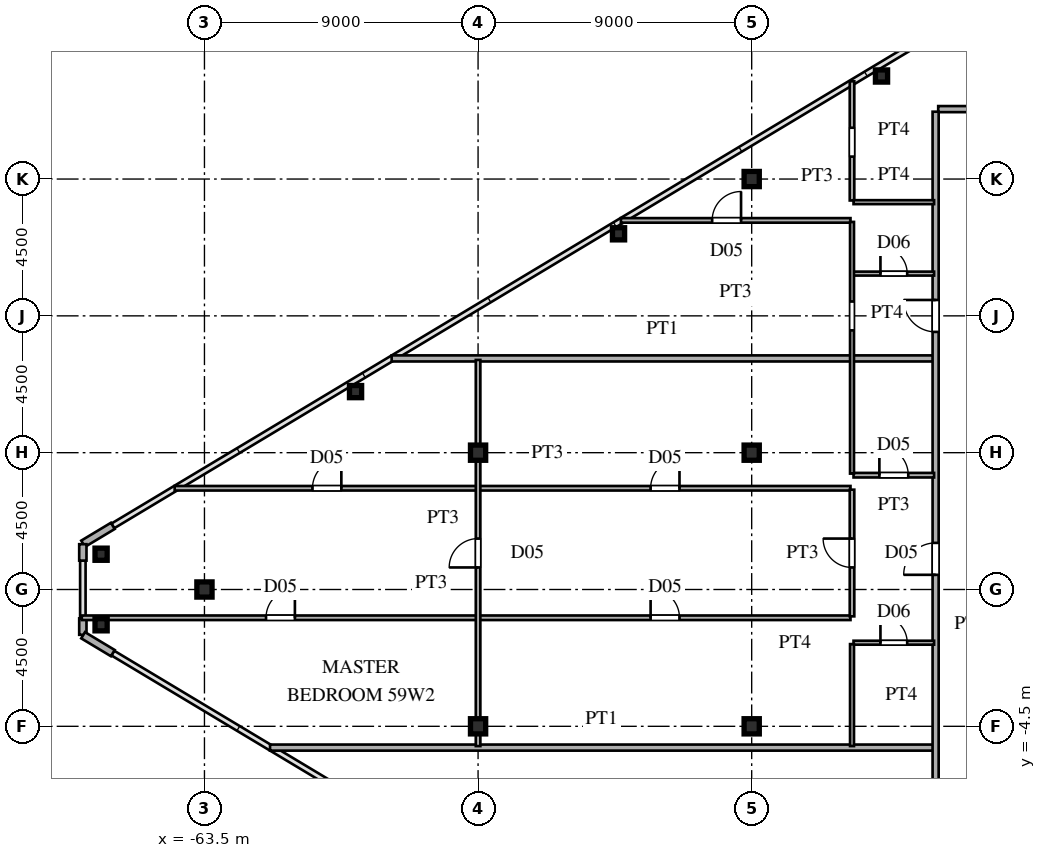
"""IFC4 building model, lengths in metres.
Left out: names, types, materials, properties, quantities, classifications, styles, units other than length and angle.
Written with IfcOpenShell. Run it as: python <this file> out.ifc"""

import sys

from ifc_helpers import new_model, si_unit, direction, frame, frame_2d, origin, origin_2d, place, context, subcontext, project, spatial, rectangle, hollow_rectangle, i_section, extrude, source, transform, mapped, element, fill, save


model = new_model("IFC4")
c1 = context("Model", 3, precision=1e-05, world=origin(), true_north=direction((0.0, 1.0)))
c2 = subcontext(c1, "Body", "Model", "MODEL_VIEW")
j1 = project(units=[si_unit("LENGTHUNIT", "METRE"), si_unit("PLANEANGLEUNIT", "RADIAN")], contexts=[c1])
p1 = place(None, origin())
s1 = spatial("IfcSite", under=j1, at=p1, CompositionType="ELEMENT")
p2 = place(p1, origin())
s2 = spatial("IfcBuilding", under=s1, at=p2, CompositionType="ELEMENT")
p3 = place(p2, frame((0.0, 0.0, 221.1)))
s3 = spatial("IfcBuildingStorey", under=s2, at=p3, CompositionType="ELEMENT", Elevation=221.1)
m1 = source(origin(), c2, "Body", "SweptSolid", [
    extrude(i_section(OverallWidth=0.5, OverallDepth=0.5, WebThickness=0.02, FlangeThickness=0.032, at=origin_2d()), origin(), (0.0, 0.0, 1.0), 3.6),
])
for number, where, z_axis, x_axis in (
    (1, (-45.5, -4.5, 0.0), (0.0, 0.0, 1.0), (1.0, 0.0, 0.0)),
    (2, (-45.5, 4.5, 0.0), (0.0, 0.0, 1.0), (1.0, 0.0, 0.0)),
    (3, (-45.5, 13.5, 0.0), (0.0, 0.0, 1.0), (1.0, 0.0, 0.0)),
    (4, (-54.5, -4.5, 0.0), (0.0, 0.0, 1.0), (1.0, 0.0, 0.0)),
    (5, (-54.5, 4.5, 0.0), (0.0, 0.0, 1.0), (1.0, 0.0, 0.0)),
    (6, (-63.5, 0.0, 0.0), (0.0, 0.0, 1.0), (1.0, 0.0, 0.0)),
):
    element("IfcColumn", number, at=place(p3, frame(where, z_axis=z_axis, x_axis=x_axis)), inside=s3, PredefinedType="COLUMN", context=c2, shape_type="MappedRepresentation", body=[
        mapped(m1, transform((0.0, 0.0, 0.0), scale=1.0)),
    ])
m2 = source(origin(), c2, "Body", "SweptSolid", [
    extrude(hollow_rectangle(XDim=0.4, YDim=0.4, WallThickness=0.016, at=origin_2d()), origin(), (0.0, 0.0, 1.0), 3.6),
])
for number, where, z_axis, x_axis in (
    (7, (-66.9, 1.16, 0.0), (0.0, 0.0, 1.0), (1.0, 0.0, 0.0)),
    (8, (-66.9, -1.16, 0.0), (0.0, 0.0, 1.0), (1.0, 0.0, 0.0)),
    (9, (-41.23, 16.889, 0.0), (0.0, 0.0, 1.0), (1.0, 0.0, 0.0)),
    (10, (-49.88, 11.699, 0.0), (0.0, 0.0, 1.0), (1.0, 0.0, 0.0)),
    (11, (-58.53, 6.509, 0.0), (0.0, 0.0, 1.0), (1.0, 0.0, 0.0)),
):
    element("IfcColumn", number, at=place(p3, frame(where, z_axis=z_axis, x_axis=x_axis)), inside=s3, PredefinedType="COLUMN", context=c2, shape_type="MappedRepresentation", body=[
        mapped(m2, transform((0.0, 0.0, 0.0), scale=1.0)),
    ])
p4 = place(p3, frame((-66.514, 2.092, 0.0), z_axis=(0.0, 0.0, 1.0), x_axis=(-0.85743623509, -0.514590228002, 0.0)))
e12 = element("IfcWall", 12, at=p4, inside=s3, PredefinedType="SOLIDWALL", context=c2, shape_type="SweptSolid", body=[
    extrude(rectangle(XDim=1.14, YDim=0.24, at=frame_2d((0.57, 0.0))), origin(), (0.0, 0.0, 1.0), 3.34),
])
for number, where, z_axis, x_axis in (
    (13, (-67.5, 1.49, 0.0), (0.0, 0.0, 1.0), (0.0, -1.0, 0.0)),
    (14, (-67.5, -0.95, 0.0), (0.0, 0.0, 1.0), (0.0, -1.0, 0.0)),
):
    element("IfcWall", number, at=place(p3, frame(where, z_axis=z_axis, x_axis=x_axis)), inside=s3, PredefinedType="SOLIDWALL", context=c2, shape_type="SweptSolid", body=[
        extrude(rectangle(XDim=0.54, YDim=0.24, at=frame_2d((0.27, 0.0))), origin(), (0.0, 0.0, 1.0), 3.34),
    ])
p5 = place(p3, frame((-67.491, -1.505, 0.0), z_axis=(0.0, 0.0, 1.0), x_axis=(0.85743623509, -0.514590228002, 0.0)))
e15 = element("IfcWall", 15, at=p5, inside=s3, PredefinedType="SOLIDWALL", context=c2, shape_type="SweptSolid", body=[
    extrude(rectangle(XDim=1.14, YDim=0.24, at=frame_2d((0.57, 0.0))), origin(), (0.0, 0.0, 1.0), 3.34),
])
p6 = place(p3, frame((-61.343, -5.2, 0.0), z_axis=(0.0, 0.0, 1.0), x_axis=(1.0, 0.0, 0.0)))
e16 = element("IfcWall", 16, at=p6, inside=s3, PredefinedType="PARTITIONING", context=c2, shape_type="SweptSolid", body=[
    extrude(rectangle(XDim=21.813, YDim=0.2, at=frame_2d((10.906, 0.0))), origin(), (0.0, 0.0, 1.0), 3.34),
])
p7 = place(p3, frame((-42.15, -1.75, 0.0), z_axis=(0.0, 0.0, 1.0), x_axis=(1.0, 0.0, 0.0)))
e17 = element("IfcWall", 17, at=p7, inside=s3, PredefinedType="PARTITIONING", context=c2, shape_type="SweptSolid", body=[
    extrude(rectangle(XDim=2.65, YDim=0.13, at=frame_2d((1.325, 0.0))), origin(), (0.0, 0.0, 1.0), 3.34),
])
p8 = place(p7, frame((0.885, 0.0, 0.0)))
e18 = element("IfcOpeningElement", 18, at=p8, cuts=e17, PredefinedType="OPENING", context=c2, shape_type="SweptSolid", body=[
    extrude(rectangle(XDim=0.88, YDim=2.1, at=frame_2d((0.44, 1.05))), frame((0.0, 0.075, 0.0), z_axis=(0.0, -1.0, 0.0), x_axis=(1.0, 0.0, 0.0)), (0.0, 0.0, 1.0), 0.15),
])
p9 = place(p3, frame((-67.535, -0.93, 0.0), z_axis=(0.0, 0.0, 1.0), x_axis=(1.0, 0.0, 0.0)))
e19 = element("IfcWall", 19, at=p9, inside=s3, PredefinedType="PARTITIONING", context=c2, shape_type="SweptSolid", body=[
    extrude(rectangle(XDim=25.285, YDim=0.15, at=frame_2d((12.643, 0.0))), origin(), (0.0, 0.0, 1.0), 3.34),
])
p10 = place(p9, frame((18.71, 0.0, 0.0)))
e20 = element("IfcOpeningElement", 20, at=p10, cuts=e19, PredefinedType="OPENING", context=c2, shape_type="SweptSolid", body=[
    extrude(rectangle(XDim=0.95, YDim=2.15, at=frame_2d((0.475, 1.075))), frame((0.0, 0.085, 0.0), z_axis=(0.0, -1.0, 0.0), x_axis=(1.0, 0.0, 0.0)), (0.0, 0.0, 1.0), 0.17),
])
p11 = place(p9, frame((6.06, 0.0, 0.0)))
e21 = element("IfcOpeningElement", 21, at=p11, cuts=e19, PredefinedType="OPENING", context=c2, shape_type="SweptSolid", body=[
    extrude(rectangle(XDim=0.95, YDim=2.15, at=frame_2d((0.475, 1.075))), frame((0.0, 0.085, 0.0), z_axis=(0.0, -1.0, 0.0), x_axis=(1.0, 0.0, 0.0)), (0.0, 0.0, 1.0), 0.17),
])
p12 = place(p3, frame((-64.48, 3.33, 0.0), z_axis=(0.0, 0.0, 1.0), x_axis=(1.0, 0.0, 0.0)))
e22 = element("IfcWall", 22, at=p12, inside=s3, PredefinedType="PARTITIONING", context=c2, shape_type="SweptSolid", body=[
    extrude(rectangle(XDim=22.23, YDim=0.15, at=frame_2d((11.115, 0.0))), origin(), (0.0, 0.0, 1.0), 3.34),
])
p13 = place(p12, frame((15.655, 0.0, 0.0)))
e23 = element("IfcOpeningElement", 23, at=p13, cuts=e22, PredefinedType="OPENING", context=c2, shape_type="SweptSolid", body=[
    extrude(rectangle(XDim=0.95, YDim=2.15, at=frame_2d((0.475, 1.075))), frame((0.0, 0.085, 0.0), z_axis=(0.0, -1.0, 0.0), x_axis=(1.0, 0.0, 0.0)), (0.0, 0.0, 1.0), 0.17),
])
p14 = place(p12, frame((4.533, 0.0, 0.0)))
e24 = element("IfcOpeningElement", 24, at=p14, cuts=e22, PredefinedType="OPENING", context=c2, shape_type="SweptSolid", body=[
    extrude(rectangle(XDim=0.95, YDim=2.15, at=frame_2d((0.475, 1.075))), frame((0.0, 0.085, 0.0), z_axis=(0.0, -1.0, 0.0), x_axis=(1.0, 0.0, 0.0)), (0.0, 0.0, 1.0), 0.17),
])
p15 = place(p3, frame((-42.15, 3.76, 0.0), z_axis=(0.0, 0.0, 1.0), x_axis=(1.0, 0.0, 0.0)))
e25 = element("IfcWall", 25, at=p15, inside=s3, PredefinedType="PARTITIONING", context=c2, shape_type="SweptSolid", body=[
    extrude(rectangle(XDim=2.65, YDim=0.15, at=frame_2d((1.325, 0.0))), origin(), (0.0, 0.0, 1.0), 3.34),
])
p16 = place(p15, frame((0.85, 0.0, 0.0)))
e26 = element("IfcOpeningElement", 26, at=p16, cuts=e25, PredefinedType="OPENING", context=c2, shape_type="SweptSolid", body=[
    extrude(rectangle(XDim=0.95, YDim=2.15, at=frame_2d((0.475, 1.075))), frame((0.0, 0.085, 0.0), z_axis=(0.0, -1.0, 0.0), x_axis=(1.0, 0.0, 0.0)), (0.0, 0.0, 1.0), 0.17),
])
p17 = place(p3, frame((-57.343, 7.6, 0.0), z_axis=(0.0, 0.0, 1.0), x_axis=(1.0, 0.0, 0.0)))
e27 = element("IfcWall", 27, at=p17, inside=s3, PredefinedType="PARTITIONING", context=c2, shape_type="SweptSolid", body=[
    extrude(rectangle(XDim=17.813, YDim=0.2, at=frame_2d((8.906, 0.0))), origin(), (0.0, 0.0, 1.0), 3.34),
])
p18 = place(p3, frame((-42.15, 10.39, 0.0), z_axis=(0.0, 0.0, 1.0), x_axis=(1.0, 0.0, 0.0)))
e28 = element("IfcWall", 28, at=p18, inside=s3, PredefinedType="PARTITIONING", context=c2, shape_type="SweptSolid", body=[
    extrude(rectangle(XDim=2.65, YDim=0.13, at=frame_2d((1.325, 0.0))), origin(), (0.0, 0.0, 1.0), 3.34),
])
p19 = place(p18, frame((0.885, 0.0, 0.0)))
e29 = element("IfcOpeningElement", 29, at=p19, cuts=e28, PredefinedType="OPENING", context=c2, shape_type="SweptSolid", body=[
    extrude(rectangle(XDim=0.88, YDim=2.1, at=frame_2d((0.44, 1.05))), frame((0.0, 0.075, 0.0), z_axis=(0.0, -1.0, 0.0), x_axis=(1.0, 0.0, 0.0)), (0.0, 0.0, 1.0), 0.15),
])
p20 = place(p3, frame((-49.802, 12.14, 0.0), z_axis=(0.0, 0.0, 1.0), x_axis=(1.0, 0.0, 0.0)))
e30 = element("IfcWall", 30, at=p20, inside=s3, PredefinedType="PARTITIONING", context=c2, shape_type="SweptSolid", body=[
    extrude(rectangle(XDim=7.552, YDim=0.15, at=frame_2d((3.776, 0.0))), origin(), (0.0, 0.0, 1.0), 3.34),
])
p21 = place(p20, frame((3.002, 0.0, 0.0)))
e31 = element("IfcOpeningElement", 31, at=p21, cuts=e30, PredefinedType="OPENING", context=c2, shape_type="SweptSolid", body=[
    extrude(rectangle(XDim=0.95, YDim=2.15, at=frame_2d((0.475, 1.075))), frame((0.0, 0.085, 0.0), z_axis=(0.0, -1.0, 0.0), x_axis=(1.0, 0.0, 0.0)), (0.0, 0.0, 1.0), 0.17),
])
p22 = place(p3, frame((-42.15, 12.74, 0.0), z_axis=(0.0, 0.0, 1.0), x_axis=(1.0, 0.0, 0.0)))
e32 = element("IfcWall", 32, at=p22, inside=s3, PredefinedType="PARTITIONING", context=c2, shape_type="SweptSolid", body=[
    extrude(rectangle(XDim=2.65, YDim=0.13, at=frame_2d((1.325, 0.0))), origin(), (0.0, 0.0, 1.0), 3.34),
])
p23 = place(p3, frame((-39.365, 15.8, 0.0), z_axis=(0.0, 0.0, 1.0), x_axis=(1.0, 0.0, 0.0)))
e33 = element("IfcWall", 33, at=p23, inside=s3, PredefinedType="PARTITIONING", context=c2, shape_type="SweptSolid", body=[
    extrude(rectangle(XDim=11.74, YDim=0.2, at=frame_2d((5.87, 0.0))), origin(), (0.0, 0.0, 1.0), 3.34),
])
p24 = place(p3, frame((-54.5, -5.15, 0.0), z_axis=(0.0, 0.0, 1.0), x_axis=(0.0, 1.0, 0.0)))
e34 = element("IfcWall", 34, at=p24, inside=s3, PredefinedType="PARTITIONING", context=c2, shape_type="SweptSolid", body=[
    extrude(rectangle(XDim=0.63, YDim=0.15, at=frame_2d((0.315, 0.0))), origin(), (0.0, 0.0, 1.0), 3.34),
])
p25 = place(p3, frame((-54.5, -4.52, 0.0), z_axis=(0.0, 0.0, 1.0), x_axis=(0.0, 1.0, 0.0)))
e35 = element("IfcWall", 35, at=p25, inside=s3, PredefinedType="PARTITIONING", context=c2, shape_type="SweptSolid", body=[
    extrude(rectangle(XDim=9.04, YDim=0.15, at=frame_2d((4.52, 0.0))), origin(), (0.0, 0.0, 1.0), 2.44),
])
p26 = place(p25, frame((5.245, 0.0, 0.0)))
e36 = element("IfcOpeningElement", 36, at=p26, cuts=e35, PredefinedType="OPENING", context=c2, shape_type="SweptSolid", body=[
    extrude(rectangle(XDim=0.95, YDim=2.15, at=frame_2d((0.475, 1.075))), frame((0.0, 0.085, 0.0), z_axis=(0.0, -1.0, 0.0), x_axis=(1.0, 0.0, 0.0)), (0.0, 0.0, 1.0), 0.17),
])
p27 = place(p3, frame((-54.5, 4.52, 0.0), z_axis=(0.0, 0.0, 1.0), x_axis=(0.0, 1.0, 0.0)))
e37 = element("IfcWall", 37, at=p27, inside=s3, PredefinedType="PARTITIONING", context=c2, shape_type="SweptSolid", body=[
    extrude(rectangle(XDim=3.03, YDim=0.15, at=frame_2d((1.515, 0.0))), origin(), (0.0, 0.0, 1.0), 3.34),
])
p28 = place(p3, frame((-42.2, -5.15, 0.0), z_axis=(0.0, 0.0, 1.0), x_axis=(0.0, 1.0, 0.0)))
e38 = element("IfcWall", 38, at=p28, inside=s3, PredefinedType="PARTITIONING", context=c2, shape_type="SweptSolid", body=[
    extrude(rectangle(XDim=3.354, YDim=0.13, at=frame_2d((1.677, 0.0))), origin(), (0.0, 0.0, 1.0), 3.34),
])
p29 = place(p3, frame((-42.2, -0.883, 0.0), z_axis=(0.0, 0.0, 1.0), x_axis=(0.0, 1.0, 0.0)))
e39 = element("IfcWall", 39, at=p29, inside=s3, PredefinedType="PARTITIONING", context=c2, shape_type="SweptSolid", body=[
    extrude(rectangle(XDim=4.166, YDim=0.15, at=frame_2d((2.083, 0.0))), origin(), (0.0, 0.0, 1.0), 3.34),
])
p30 = place(p29, frame((1.608, 0.0, 0.0)))
e40 = element("IfcOpeningElement", 40, at=p30, cuts=e39, PredefinedType="OPENING", context=c2, shape_type="SweptSolid", body=[
    extrude(rectangle(XDim=0.95, YDim=2.15, at=frame_2d((0.475, 1.075))), frame((0.0, 0.085, 0.0), z_axis=(0.0, -1.0, 0.0), x_axis=(1.0, 0.0, 0.0)), (0.0, 0.0, 1.0), 0.17),
])
p31 = place(p3, frame((-42.2, 3.812, 0.0), z_axis=(0.0, 0.0, 1.0), x_axis=(0.0, 1.0, 0.0)))
e41 = element("IfcWall", 41, at=p31, inside=s3, PredefinedType="PARTITIONING", context=c2, shape_type="SweptSolid", body=[
    extrude(rectangle(XDim=8.278, YDim=0.13, at=frame_2d((4.139, 0.0))), origin(), (0.0, 0.0, 1.0), 3.34),
])
p32 = place(p31, frame((4.71, 0.0, 0.0)))
e42 = element("IfcOpeningElement", 42, at=p32, cuts=e41, PredefinedType="OPENING", context=c2, shape_type="SweptSolid", body=[
    extrude(rectangle(XDim=0.95, YDim=2.15, at=frame_2d((0.475, 1.075))), frame((0.0, 0.075, 0.0), z_axis=(0.0, -1.0, 0.0), x_axis=(1.0, 0.0, 0.0)), (0.0, 0.0, 1.0), 0.15),
])
p33 = place(p3, frame((-42.2, 12.795, 0.0), z_axis=(0.0, 0.0, 1.0), x_axis=(0.0, 1.0, 0.0)))
e43 = element("IfcWall", 43, at=p33, inside=s3, PredefinedType="PARTITIONING", context=c2, shape_type="SweptSolid", body=[
    extrude(rectangle(XDim=3.92, YDim=0.15, at=frame_2d((1.96, 0.0))), origin(), (0.0, 0.0, 1.0), 3.34),
])
p34 = place(p33, frame((1.442, 0.0, 0.0)))
e44 = element("IfcOpeningElement", 44, at=p34, cuts=e43, PredefinedType="OPENING", context=c2, shape_type="SweptSolid", body=[
    extrude(rectangle(XDim=0.95, YDim=2.15, at=frame_2d((0.475, 1.075))), frame((0.0, 0.085, 0.0), z_axis=(0.0, -1.0, 0.0), x_axis=(1.0, 0.0, 0.0)), (0.0, 0.0, 1.0), 0.17),
])
p35 = place(p3, frame((-39.45, -15.715, 0.0), z_axis=(0.0, 0.0, 1.0), x_axis=(0.0, 1.0, 0.0)))
e45 = element("IfcWall", 45, at=p35, inside=s3, PredefinedType="PARTITIONING", context=c2, shape_type="SweptSolid", body=[
    extrude(rectangle(XDim=31.43, YDim=0.2, at=frame_2d((15.715, 0.0))), origin(), (0.0, 0.0, 1.0), 3.34),
])
p36 = place(p35, frame((4.69, 0.0, 0.0)))
e46 = element("IfcOpeningElement", 46, at=p36, cuts=e45, PredefinedType="OPENING", context=c2, shape_type="SweptSolid", body=[
    extrude(rectangle(XDim=1.05, YDim=2.25, at=frame_2d((0.525, 1.125))), frame((0.0, 0.11, 0.0), z_axis=(0.0, -1.0, 0.0), x_axis=(1.0, 0.0, 0.0)), (0.0, 0.0, 1.0), 0.22),
])
p37 = place(p35, frame((16.198, 0.0, 0.0)))
e47 = element("IfcOpeningElement", 47, at=p37, cuts=e45, PredefinedType="OPENING", context=c2, shape_type="SweptSolid", body=[
    extrude(rectangle(XDim=1.05, YDim=2.25, at=frame_2d((0.525, 1.125))), frame((0.0, 0.11, 0.0), z_axis=(0.0, -1.0, 0.0), x_axis=(1.0, 0.0, 0.0)), (0.0, 0.0, 1.0), 0.22),
])
p38 = place(p35, frame((24.188, 0.0, 0.0)))
e48 = element("IfcOpeningElement", 48, at=p38, cuts=e45, PredefinedType="OPENING", context=c2, shape_type="SweptSolid", body=[
    extrude(rectangle(XDim=1.05, YDim=2.25, at=frame_2d((0.525, 1.125))), frame((0.0, 0.11, 0.0), z_axis=(0.0, -1.0, 0.0), x_axis=(1.0, 0.0, 0.0)), (0.0, 0.0, 1.0), 0.22),
])
m3 = source(origin(), c2, "Body", "SweptSolid", [
    extrude(rectangle(XDim=0.88, YDim=2.1, at=frame_2d((0.44, 1.05))), frame((0.0, 0.025, 0.0), z_axis=(0.0, -1.0, 0.0), x_axis=(1.0, 0.0, 0.0)), (0.0, 0.0, 1.0), 0.05),
])
p39 = place(p8, origin())
e49 = element("IfcDoor", 49, at=p39, inside=s3, OperationType="SINGLE_SWING_LEFT", PredefinedType="DOOR", context=c2, shape_type="MappedRepresentation", body=[
    mapped(m3, transform((0.0, 0.0, 0.0), scale=1.0)),
])
fill(e18, e49)
m4 = source(origin(), c2, "Body", "SweptSolid", [
    extrude(rectangle(XDim=0.95, YDim=2.15, at=frame_2d((0.475, 1.075))), frame((0.0, 0.025, 0.0), z_axis=(0.0, -1.0, 0.0), x_axis=(1.0, 0.0, 0.0)), (0.0, 0.0, 1.0), 0.05),
])
p40 = place(p10, origin())
e50 = element("IfcDoor", 50, at=p40, inside=s3, OperationType="SINGLE_SWING_LEFT", PredefinedType="DOOR", context=c2, shape_type="MappedRepresentation", body=[
    mapped(m4, transform((0.0, 0.0, 0.0), scale=1.0)),
])
fill(e20, e50)
p41 = place(p11, origin())
e51 = element("IfcDoor", 51, at=p41, inside=s3, OperationType="SINGLE_SWING_RIGHT", PredefinedType="DOOR", context=c2, shape_type="MappedRepresentation", body=[
    mapped(m4, transform((0.0, 0.0, 0.0), scale=1.0)),
])
fill(e21, e51)
p42 = place(p13, origin())
e52 = element("IfcDoor", 52, at=p42, inside=s3, OperationType="SINGLE_SWING_RIGHT", PredefinedType="DOOR", context=c2, shape_type="MappedRepresentation", body=[
    mapped(m4, transform((0.0, 0.0, 0.0), scale=1.0)),
])
fill(e23, e52)
p43 = place(p14, origin())
e53 = element("IfcDoor", 53, at=p43, inside=s3, OperationType="SINGLE_SWING_RIGHT", PredefinedType="DOOR", context=c2, shape_type="MappedRepresentation", body=[
    mapped(m4, transform((0.0, 0.0, 0.0), scale=1.0)),
])
fill(e24, e53)
p44 = place(p16, origin())
e54 = element("IfcDoor", 54, at=p44, inside=s3, OperationType="SINGLE_SWING_LEFT", PredefinedType="DOOR", context=c2, shape_type="MappedRepresentation", body=[
    mapped(m4, transform((0.0, 0.0, 0.0), scale=1.0)),
])
fill(e26, e54)
p45 = place(p19, origin())
e55 = element("IfcDoor", 55, at=p45, inside=s3, OperationType="SINGLE_SWING_LEFT", PredefinedType="DOOR", context=c2, shape_type="MappedRepresentation", body=[
    mapped(m3, transform((0.0, 0.0, 0.0), scale=1.0)),
])
fill(e29, e55)
p46 = place(p21, origin())
e56 = element("IfcDoor", 56, at=p46, inside=s3, OperationType="SINGLE_SWING_RIGHT", PredefinedType="DOOR", context=c2, shape_type="MappedRepresentation", body=[
    mapped(m4, transform((0.0, 0.0, 0.0), scale=1.0)),
])
fill(e31, e56)
p47 = place(p26, origin())
e57 = element("IfcDoor", 57, at=p47, inside=s3, OperationType="SINGLE_SWING_LEFT", PredefinedType="DOOR", context=c2, shape_type="MappedRepresentation", body=[
    mapped(m4, transform((0.0, 0.0, 0.0), scale=1.0)),
])
fill(e36, e57)
p48 = place(p30, origin())
e58 = element("IfcDoor", 58, at=p48, inside=s3, OperationType="SINGLE_SWING_RIGHT", PredefinedType="DOOR", context=c2, shape_type="MappedRepresentation", body=[
    mapped(m4, transform((0.0, 0.0, 0.0), scale=1.0)),
])
fill(e40, e58)
m5 = source(origin(), c2, "Body", "SweptSolid", [
    extrude(rectangle(XDim=1.05, YDim=2.25, at=frame_2d((0.525, 1.125))), frame((0.0, 0.025, 0.0), z_axis=(0.0, -1.0, 0.0), x_axis=(1.0, 0.0, 0.0)), (0.0, 0.0, 1.0), 0.05),
])
p49 = place(p37, origin())
e59 = element("IfcDoor", 59, at=p49, inside=s3, OperationType="SINGLE_SWING_LEFT", PredefinedType="DOOR", context=c2, shape_type="MappedRepresentation", body=[
    mapped(m5, transform((0.0, 0.0, 0.0), scale=1.0)),
])
fill(e47, e59)
p50 = place(p38, origin())
e60 = element("IfcDoor", 60, at=p50, inside=s3, OperationType="SINGLE_SWING_RIGHT", PredefinedType="DOOR", context=c2, shape_type="MappedRepresentation", body=[
    mapped(m5, transform((0.0, 0.0, 0.0), scale=1.0)),
])
fill(e48, e60)
save(model, sys.argv[1])
